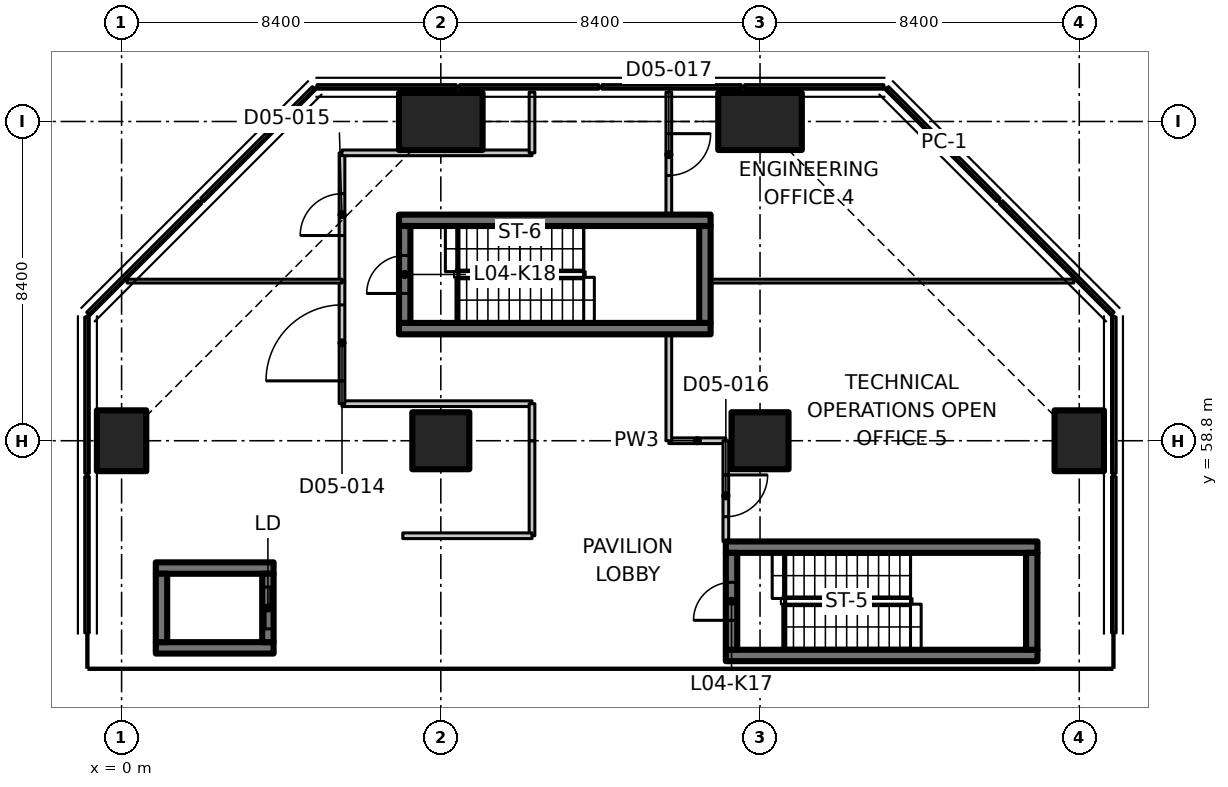
"""IFC4 building model, lengths in metres.
Left out: names, types, materials, properties, quantities, classifications, styles, units other than length and angle.
Written with IfcOpenShell. Run it as: python <this file> out.ifc"""

import sys

from ifc_helpers import new_model, si_unit, direction, frame, frame_2d, origin, origin_2d, place, context, subcontext, project, spatial, polyline, rectangle, outline, extrude, element, fill, save


model = new_model("IFC4")
c1 = context("Model", 3, precision=1e-05, world=origin(), true_north=direction((0.0, 1.0)))
c2 = subcontext(c1, "Body", "Model", "MODEL_VIEW")
j1 = project(units=[si_unit("LENGTHUNIT", "METRE"), si_unit("PLANEANGLEUNIT", "RADIAN")], contexts=[c1])
p1 = place(None, origin())
s1 = spatial("IfcSite", under=j1, at=p1, CompositionType="ELEMENT")
p2 = place(p1, origin())
s2 = spatial("IfcBuilding", under=s1, at=p2, CompositionType="ELEMENT")
p3 = place(p2, frame((0.0, 0.0, 27.5)))
s3 = spatial("IfcBuildingStorey", under=s2, at=p3, CompositionType="ELEMENT", Elevation=27.5)
p4 = place(p3, frame((0.0, 58.8, 0.0), z_axis=(0.0, 0.0, 1.0), x_axis=(1.0, 0.0, 0.0)))
e1 = element("IfcColumn", 1, at=p4, inside=s3, PredefinedType="COLUMN", context=c2, shape_type="SweptSolid", body=[
    extrude(rectangle(XDim=1.3, YDim=1.6, at=origin_2d()), origin(), (0.0, 0.0, 1.0), 4.25),
])
p5 = place(p3, frame((8.4, 58.8, 0.0), z_axis=(0.0, 0.0, 1.0), x_axis=(1.0, 0.0, 0.0)))
e2 = element("IfcColumn", 2, at=p5, inside=s3, PredefinedType="COLUMN", context=c2, shape_type="SweptSolid", body=[
    extrude(rectangle(XDim=1.5, YDim=1.5, at=origin_2d()), origin(), (0.0, 0.0, 1.0), 4.25),
])
p6 = place(p3, frame((8.4, 67.2, 0.0), z_axis=(0.0, 0.0, 1.0), x_axis=(0.0, 1.0, 0.0)))
e3 = element("IfcColumn", 3, at=p6, inside=s3, PredefinedType="COLUMN", context=c2, shape_type="SweptSolid", body=[
    extrude(rectangle(XDim=1.5, YDim=2.2, at=origin_2d()), origin(), (0.0, 0.0, 1.0), 4.25),
])
p7 = place(p3, frame((16.8, 58.8, 0.0), z_axis=(0.0, 0.0, 1.0), x_axis=(1.0, 0.0, 0.0)))
e4 = element("IfcColumn", 4, at=p7, inside=s3, PredefinedType="COLUMN", context=c2, shape_type="SweptSolid", body=[
    extrude(rectangle(XDim=1.5, YDim=1.5, at=origin_2d()), origin(), (0.0, 0.0, 1.0), 4.25),
])
p8 = place(p3, frame((16.8, 67.2, 0.0), z_axis=(0.0, 0.0, 1.0), x_axis=(0.0, 1.0, 0.0)))
e5 = element("IfcColumn", 5, at=p8, inside=s3, PredefinedType="COLUMN", context=c2, shape_type="SweptSolid", body=[
    extrude(rectangle(XDim=1.5, YDim=2.2, at=origin_2d()), origin(), (0.0, 0.0, 1.0), 4.25),
])
p9 = place(p3, frame((25.2, 58.8, 0.0), z_axis=(0.0, 0.0, 1.0), x_axis=(1.0, 0.0, 0.0)))
e6 = element("IfcColumn", 6, at=p9, inside=s3, PredefinedType="COLUMN", context=c2, shape_type="SweptSolid", body=[
    extrude(rectangle(XDim=1.3, YDim=1.6, at=origin_2d()), origin(), (0.0, 0.0, 1.0), 4.25),
])
p10 = place(p2, origin())
s4 = spatial("IfcBuildingStorey", under=s2, at=p10, CompositionType="ELEMENT", Elevation=0.0)
for number, where, z_axis, x_axis in (
    (7, (0.6, 51.6, -6.3), (0.0, 0.0, 1.0), (1.0, 0.0, 0.0)),
    (8, (9.0, 51.6, -6.3), (0.0, 0.0, 1.0), (1.0, 0.0, 0.0)),
):
    element("IfcWall", number, at=place(p10, frame(where, z_axis=z_axis, x_axis=x_axis)), inside=s4, PredefinedType="SOLIDWALL", context=c2, shape_type="SweptSolid", body=[
        extrude(rectangle(XDim=7.2, YDim=2.4, at=frame_2d((3.6, 0.0))), origin(), (0.0, 0.0, 1.0), 42.55),
    ])
p11 = place(p10, frame((17.4, 51.6, -6.3), z_axis=(0.0, 0.0, 1.0), x_axis=(1.0, 0.0, 0.0)))
e9 = element("IfcWall", 9, at=p11, inside=s4, PredefinedType="SOLIDWALL", context=c2, shape_type="SweptSolid", body=[
    extrude(rectangle(XDim=7.2, YDim=2.4, at=frame_2d((3.6, 0.0))), origin(), (0.0, 0.0, 1.0), 42.55),
])
for number, where, z_axis, x_axis in (
    (10, (-1.2, 52.8, 0.0), (0.0, 0.0, 1.0), (0.0, 1.0, 0.0)),
    (11, (26.4, 52.8, 0.0), (0.0, 0.0, 1.0), (0.0, 1.0, 0.0)),
):
    element("IfcWall", number, at=place(p10, frame(where, z_axis=z_axis, x_axis=x_axis)), inside=s4, PredefinedType="SOLIDWALL", context=c2, shape_type="SweptSolid", body=[
        extrude(rectangle(XDim=0.9, YDim=0.6, at=frame_2d((0.45, 0.0))), origin(), (0.0, 0.0, 1.0), 36.23),
    ])
p12 = place(p3, origin())
e12 = element("IfcWall", 12, at=p12, inside=s3, PredefinedType="SOLIDWALL", context=c2, shape_type="SweptSolid", body=[
    extrude(outline(polyline([(26.17, 57.855), (26.05, 57.855), (26.05, 53.745), (26.17, 53.745), (26.17, 57.855)])), origin(), (0.0, 0.0, 1.0), 4.25),
])
p13 = place(p3, origin())
e13 = element("IfcWall", 13, at=p13, inside=s3, PredefinedType="SOLIDWALL", context=c2, shape_type="SweptSolid", body=[
    extrude(outline(polyline([(26.17, 62.055), (26.05, 62.055), (26.05, 57.945), (26.17, 57.945), (26.17, 62.055)])), origin(), (0.0, 0.0, 1.0), 4.25),
])
p14 = place(p3, origin())
e14 = element("IfcWall", 14, at=p14, inside=s3, PredefinedType="SOLIDWALL", context=c2, shape_type="SweptSolid", body=[
    extrude(outline(polyline([(26.033, 62.096), (23.096, 65.033), (23.181, 65.118), (26.118, 62.181), (26.033, 62.096)])), origin(), (0.0, 0.0, 1.0), 4.25),
])
p15 = place(p3, origin())
e15 = element("IfcWall", 15, at=p15, inside=s3, PredefinedType="SOLIDWALL", context=c2, shape_type="SweptSolid", body=[
    extrude(outline(polyline([(23.033, 65.096), (20.096, 68.033), (20.181, 68.118), (23.118, 65.181), (23.033, 65.096)])), origin(), (0.0, 0.0, 1.0), 4.25),
])
p16 = place(p3, origin())
e16 = element("IfcWall", 16, at=p16, inside=s3, PredefinedType="SOLIDWALL", context=c2, shape_type="SweptSolid", body=[
    extrude(outline(polyline([(16.395, 68.17), (16.395, 68.05), (20.055, 68.05), (20.055, 68.17), (16.395, 68.17)])), origin(), (0.0, 0.0, 1.0), 4.25),
])
p17 = place(p3, origin())
e17 = element("IfcWall", 17, at=p17, inside=s3, PredefinedType="SOLIDWALL", context=c2, shape_type="SweptSolid", body=[
    extrude(outline(polyline([(12.645, 68.17), (12.645, 68.05), (16.305, 68.05), (16.305, 68.17), (12.645, 68.17)])), origin(), (0.0, 0.0, 1.0), 4.25),
])
p18 = place(p3, origin())
e18 = element("IfcWall", 18, at=p18, inside=s3, PredefinedType="SOLIDWALL", context=c2, shape_type="SweptSolid", body=[
    extrude(outline(polyline([(8.895, 68.17), (8.895, 68.05), (12.555, 68.05), (12.555, 68.17), (8.895, 68.17)])), origin(), (0.0, 0.0, 1.0), 4.25),
])
p19 = place(p3, origin())
e19 = element("IfcWall", 19, at=p19, inside=s3, PredefinedType="SOLIDWALL", context=c2, shape_type="SweptSolid", body=[
    extrude(outline(polyline([(5.145, 68.17), (5.145, 68.05), (8.805, 68.05), (8.805, 68.17), (5.145, 68.17)])), origin(), (0.0, 0.0, 1.0), 4.25),
])
p20 = place(p3, origin())
e20 = element("IfcWall", 20, at=p20, inside=s3, PredefinedType="SOLIDWALL", context=c2, shape_type="SweptSolid", body=[
    extrude(outline(polyline([(5.104, 68.033), (2.167, 65.096), (2.082, 65.181), (5.019, 68.118), (5.104, 68.033)])), origin(), (0.0, 0.0, 1.0), 4.25),
])
p21 = place(p3, origin())
e21 = element("IfcWall", 21, at=p21, inside=s3, PredefinedType="SOLIDWALL", context=c2, shape_type="SweptSolid", body=[
    extrude(outline(polyline([(2.104, 65.033), (-0.833, 62.096), (-0.918, 62.181), (2.019, 65.118), (2.104, 65.033)])), origin(), (0.0, 0.0, 1.0), 4.25),
])
p22 = place(p3, origin())
e22 = element("IfcWall", 22, at=p22, inside=s3, PredefinedType="SOLIDWALL", context=c2, shape_type="SweptSolid", body=[
    extrude(outline(polyline([(-0.97, 57.945), (-0.85, 57.945), (-0.85, 62.055), (-0.97, 62.055), (-0.97, 57.945)])), origin(), (0.0, 0.0, 1.0), 4.25),
])
p23 = place(p3, origin())
e23 = element("IfcWall", 23, at=p23, inside=s3, PredefinedType="SOLIDWALL", context=c2, shape_type="SweptSolid", body=[
    extrude(outline(polyline([(-0.97, 53.745), (-0.85, 53.745), (-0.85, 57.855), (-0.97, 57.855), (-0.97, 53.745)])), origin(), (0.0, 0.0, 1.0), 4.25),
])
for number, where, z_axis, x_axis in (
    (24, (0.9, 53.35, 0.0), (0.0, 0.0, 1.0), (1.0, 0.0, 0.0)),
    (25, (0.9, 55.45, 0.0), (0.0, 0.0, 1.0), (1.0, 0.0, 0.0)),
):
    element("IfcWall", number, at=place(p3, frame(where, z_axis=z_axis, x_axis=x_axis)), inside=s3, PredefinedType="SHEAR", context=c2, shape_type="SweptSolid", body=[
        extrude(rectangle(XDim=3.1, YDim=0.3, at=frame_2d((1.55, 0.0))), origin(), (0.0, 0.0, 1.0), 4.25),
    ])
p24 = place(p3, frame((1.05, 53.5, 0.0), z_axis=(0.0, 0.0, 1.0), x_axis=(0.0, 1.0, 0.0)))
e26 = element("IfcWall", 26, at=p24, inside=s3, PredefinedType="SHEAR", context=c2, shape_type="SweptSolid", body=[
    extrude(rectangle(XDim=1.8, YDim=0.3, at=frame_2d((0.9, 0.0))), origin(), (0.0, 0.0, 1.0), 4.25),
])
p25 = place(p3, frame((3.85, 53.5, 0.0), z_axis=(0.0, 0.0, 1.0), x_axis=(0.0, 1.0, 0.0)))
e27 = element("IfcWall", 27, at=p25, inside=s3, PredefinedType="SHEAR", context=c2, shape_type="SweptSolid", body=[
    extrude(rectangle(XDim=1.8, YDim=0.3, at=frame_2d((0.9, 0.0))), origin(), (0.0, 0.0, 1.0), 4.25),
])
p26 = place(p25, frame((0.35, 0.0, 0.0)))
e28 = element("IfcOpeningElement", 28, at=p26, cuts=e27, PredefinedType="OPENING", context=c2, shape_type="SweptSolid", body=[
    extrude(rectangle(XDim=1.1, YDim=2.3, at=frame_2d((0.55, 1.15))), frame((0.0, 0.16, 0.0), z_axis=(0.0, -1.0, 0.0), x_axis=(1.0, 0.0, 0.0)), (0.0, 0.0, 1.0), 0.32),
])
for number, where, z_axis, x_axis in (
    (29, (15.9, 53.15, 0.0), (0.0, 0.0, 1.0), (1.0, 0.0, 0.0)),
    (30, (15.9, 56.0, 0.0), (0.0, 0.0, 1.0), (1.0, 0.0, 0.0)),
):
    element("IfcWall", number, at=place(p3, frame(where, z_axis=z_axis, x_axis=x_axis)), inside=s3, PredefinedType="SHEAR", context=c2, shape_type="SweptSolid", body=[
        extrude(rectangle(XDim=8.2, YDim=0.3, at=frame_2d((4.1, 0.0))), origin(), (0.0, 0.0, 1.0), 4.25),
    ])
p27 = place(p3, frame((16.05, 53.3, 0.0), z_axis=(0.0, 0.0, 1.0), x_axis=(0.0, 1.0, 0.0)))
e31 = element("IfcWall", 31, at=p27, inside=s3, PredefinedType="SHEAR", context=c2, shape_type="SweptSolid", body=[
    extrude(rectangle(XDim=2.55, YDim=0.3, at=frame_2d((1.275, 0.0))), origin(), (0.0, 0.0, 1.0), 4.25),
])
p28 = place(p27, frame((0.775, 0.0, 0.0)))
e32 = element("IfcOpeningElement", 32, at=p28, cuts=e31, PredefinedType="OPENING", context=c2, shape_type="SweptSolid", body=[
    extrude(rectangle(XDim=1.0, YDim=2.1, at=frame_2d((0.5, 1.05))), frame((0.0, 0.16, 0.0), z_axis=(0.0, -1.0, 0.0), x_axis=(1.0, 0.0, 0.0)), (0.0, 0.0, 1.0), 0.32),
])
p29 = place(p3, frame((23.95, 53.3, 0.0), z_axis=(0.0, 0.0, 1.0), x_axis=(0.0, 1.0, 0.0)))
e33 = element("IfcWall", 33, at=p29, inside=s3, PredefinedType="SHEAR", context=c2, shape_type="SweptSolid", body=[
    extrude(rectangle(XDim=2.55, YDim=0.3, at=frame_2d((1.275, 0.0))), origin(), (0.0, 0.0, 1.0), 4.25),
])
for number, where, z_axis, x_axis in (
    (34, (7.3, 61.75, 0.0), (0.0, 0.0, 1.0), (1.0, 0.0, 0.0)),
    (35, (7.3, 64.6, 0.0), (0.0, 0.0, 1.0), (1.0, 0.0, 0.0)),
):
    element("IfcWall", number, at=place(p3, frame(where, z_axis=z_axis, x_axis=x_axis)), inside=s3, PredefinedType="SHEAR", context=c2, shape_type="SweptSolid", body=[
        extrude(rectangle(XDim=8.2, YDim=0.3, at=frame_2d((4.1, 0.0))), origin(), (0.0, 0.0, 1.0), 4.25),
    ])
p30 = place(p3, frame((7.45, 61.9, 0.0), z_axis=(0.0, 0.0, 1.0), x_axis=(0.0, 1.0, 0.0)))
e36 = element("IfcWall", 36, at=p30, inside=s3, PredefinedType="SHEAR", context=c2, shape_type="SweptSolid", body=[
    extrude(rectangle(XDim=2.55, YDim=0.3, at=frame_2d((1.275, 0.0))), origin(), (0.0, 0.0, 1.0), 4.25),
])
p31 = place(p30, frame((0.775, 0.0, 0.0)))
e37 = element("IfcOpeningElement", 37, at=p31, cuts=e36, PredefinedType="OPENING", context=c2, shape_type="SweptSolid", body=[
    extrude(rectangle(XDim=1.0, YDim=2.1, at=frame_2d((0.5, 1.05))), frame((0.0, 0.16, 0.0), z_axis=(0.0, -1.0, 0.0), x_axis=(1.0, 0.0, 0.0)), (0.0, 0.0, 1.0), 0.32),
])
p32 = place(p3, frame((15.35, 61.9, 0.0), z_axis=(0.0, 0.0, 1.0), x_axis=(0.0, 1.0, 0.0)))
e38 = element("IfcWall", 38, at=p32, inside=s3, PredefinedType="SHEAR", context=c2, shape_type="SweptSolid", body=[
    extrude(rectangle(XDim=2.55, YDim=0.3, at=frame_2d((1.275, 0.0))), origin(), (0.0, 0.0, 1.0), 4.25),
])
p33 = place(p3, frame((10.8, 56.3, 0.0), z_axis=(0.0, 0.0, 1.0), x_axis=(0.0, 1.0, 0.0)))
e39 = element("IfcWall", 39, at=p33, inside=s3, PredefinedType="PARTITIONING", context=c2, shape_type="SweptSolid", body=[
    extrude(rectangle(XDim=2.5, YDim=0.15, at=frame_2d((1.25, 0.0))), origin(), (0.0, 0.0, 1.0), 4.23),
])
p34 = place(p3, frame((14.4, 58.8, 0.0), z_axis=(0.0, 0.0, 1.0), x_axis=(1.0, 0.0, 0.0)))
e40 = element("IfcWall", 40, at=p34, inside=s3, PredefinedType="PARTITIONING", context=c2, shape_type="SweptSolid", body=[
    extrude(rectangle(XDim=1.5, YDim=0.15, at=frame_2d((0.75, 0.0))), origin(), (0.0, 0.0, 1.0), 4.23),
])
p35 = place(p3, frame((15.9, 58.8, 0.0), z_axis=(0.0, 0.0, 1.0), x_axis=(0.0, -1.0, 0.0)))
e41 = element("IfcWall", 41, at=p35, inside=s3, PredefinedType="PARTITIONING", context=c2, shape_type="SweptSolid", body=[
    extrude(rectangle(XDim=2.65, YDim=0.15, at=frame_2d((1.325, 0.0))), origin(), (0.0, 0.0, 1.0), 4.23),
])
p36 = place(p35, frame((0.9, 0.0, 0.0)))
e42 = element("IfcOpeningElement", 42, at=p36, cuts=e41, PredefinedType="OPENING", context=c2, shape_type="SweptSolid", body=[
    extrude(rectangle(XDim=1.1, YDim=2.1, at=frame_2d((0.55, 1.05))), frame((0.0, 0.085, 0.0), z_axis=(0.0, -1.0, 0.0), x_axis=(1.0, 0.0, 0.0)), (0.0, 0.0, 1.0), 0.17),
])
p37 = place(p3, frame((10.8, 59.775, 0.0), z_axis=(0.0, 0.0, 1.0), x_axis=(-1.0, 0.0, 0.0)))
e43 = element("IfcWall", 43, at=p37, inside=s3, PredefinedType="PARTITIONING", context=c2, shape_type="SweptSolid", body=[
    extrude(rectangle(XDim=5.0, YDim=0.15, at=frame_2d((2.5, 0.0))), origin(), (0.0, 0.0, 1.0), 4.23),
])
p38 = place(p3, frame((5.8, 59.775, 0.0), z_axis=(0.0, 0.0, 1.0), x_axis=(0.0, 1.0, 0.0)))
e44 = element("IfcWall", 44, at=p38, inside=s3, PredefinedType="PARTITIONING", context=c2, shape_type="SweptSolid", body=[
    extrude(rectangle(XDim=3.225, YDim=0.15, at=frame_2d((1.613, 0.0))), origin(), (0.0, 0.0, 1.0), 4.23),
])
p39 = place(p38, frame((0.6, 0.0, 0.0)))
e45 = element("IfcOpeningElement", 45, at=p39, cuts=e44, PredefinedType="OPENING", context=c2, shape_type="SweptSolid", body=[
    extrude(rectangle(XDim=2.0, YDim=2.4, at=frame_2d((1.0, 1.2))), frame((0.0, 0.085, 0.0), z_axis=(0.0, -1.0, 0.0), x_axis=(1.0, 0.0, 0.0)), (0.0, 0.0, 1.0), 0.17),
])
p40 = place(p3, frame((5.8, 63.0, 0.0), z_axis=(0.0, 0.0, 1.0), x_axis=(0.0, 1.0, 0.0)))
e46 = element("IfcWall", 46, at=p40, inside=s3, PredefinedType="PARTITIONING", context=c2, shape_type="SweptSolid", body=[
    extrude(rectangle(XDim=3.375, YDim=0.15, at=frame_2d((1.688, 0.0))), origin(), (0.0, 0.0, 1.0), 3.88),
])
p41 = place(p40, frame((1.2, 0.0, 0.0)))
e47 = element("IfcOpeningElement", 47, at=p41, cuts=e46, PredefinedType="OPENING", context=c2, shape_type="SweptSolid", body=[
    extrude(rectangle(XDim=1.1, YDim=2.1, at=frame_2d((0.55, 1.05))), frame((0.0, 0.085, 0.0), z_axis=(0.0, -1.0, 0.0), x_axis=(1.0, 0.0, 0.0)), (0.0, 0.0, 1.0), 0.17),
])
p42 = place(p3, frame((5.8, 66.375, 0.0), z_axis=(0.0, 0.0, 1.0), x_axis=(1.0, 0.0, 0.0)))
e48 = element("IfcWall", 48, at=p42, inside=s3, PredefinedType="PARTITIONING", context=c2, shape_type="SweptSolid", body=[
    extrude(outline(polyline([(0.0, 0.0), (5.0, 0.0), (5.0, 4.23), (2.466, 4.23), (2.464, 3.88), (1.086, 3.88), (1.084, 4.23), (0.0, 4.23), (0.0, 0.0)])), frame((0.0, 0.075, 0.0), z_axis=(0.0, -1.0, 0.0), x_axis=(1.0, 0.0, 0.0)), (0.0, 0.0, 1.0), 0.15),
])
p43 = place(p3, frame((7.4, 56.3, 0.0), z_axis=(0.0, 0.0, 1.0), x_axis=(1.0, 0.0, 0.0)))
e49 = element("IfcWall", 49, at=p43, inside=s3, PredefinedType="PARTITIONING", context=c2, shape_type="SweptSolid", body=[
    extrude(rectangle(XDim=3.4, YDim=0.15, at=frame_2d((1.7, 0.0))), origin(), (0.0, 0.0, 1.0), 4.23),
])
p44 = place(p3, frame((10.8, 66.375, 0.0), z_axis=(0.0, 0.0, 1.0), x_axis=(0.0, 1.0, 0.0)))
e50 = element("IfcWall", 50, at=p44, inside=s3, PredefinedType="PARTITIONING", context=c2, shape_type="SweptSolid", body=[
    extrude(rectangle(XDim=1.598, YDim=0.15, at=frame_2d((0.799, 0.0))), origin(), (0.0, 0.0, 1.0), 3.88),
])
p45 = place(p3, frame((14.4, 67.973, 0.0), z_axis=(0.0, 0.0, 1.0), x_axis=(0.0, -1.0, 0.0)))
e51 = element("IfcWall", 51, at=p45, inside=s3, PredefinedType="PARTITIONING", context=c2, shape_type="SweptSolid", body=[
    extrude(rectangle(XDim=3.223, YDim=0.15, at=frame_2d((1.611, 0.0))), origin(), (0.0, 0.0, 1.0), 3.88),
])
p46 = place(p45, frame((1.093, 0.0, 0.0)))
e52 = element("IfcOpeningElement", 52, at=p46, cuts=e51, PredefinedType="OPENING", context=c2, shape_type="SweptSolid", body=[
    extrude(rectangle(XDim=1.1, YDim=2.1, at=frame_2d((0.55, 1.05))), frame((0.0, 0.085, 0.0), z_axis=(0.0, -1.0, 0.0), x_axis=(1.0, 0.0, 0.0)), (0.0, 0.0, 1.0), 0.17),
])
p47 = place(p3, frame((0.144, 63.0, 0.0), z_axis=(0.0, 0.0, 1.0), x_axis=(1.0, 0.0, 0.0)))
e53 = element("IfcWall", 53, at=p47, inside=s3, PredefinedType="PARTITIONING", context=c2, shape_type="SweptSolid", body=[
    extrude(outline(polyline([(0.0, 0.0), (5.656, 0.0), (5.656, 4.23), (4.721, 4.23), (4.719, 3.88), (3.392, 3.88), (3.39, 4.23), (0.0, 4.23), (0.0, 0.0)])), frame((0.0, 0.05, 0.0), z_axis=(0.0, -1.0, 0.0), x_axis=(1.0, 0.0, 0.0)), (0.0, 0.0, 1.0), 0.1),
])
p48 = place(p3, frame((10.8, 59.775, 0.0), z_axis=(0.0, 0.0, 1.0), x_axis=(0.0, -1.0, 0.0)))
e54 = element("IfcWall", 54, at=p48, inside=s3, PredefinedType="PARTITIONING", context=c2, shape_type="SweptSolid", body=[
    extrude(rectangle(XDim=0.975, YDim=0.15, at=frame_2d((0.487, 0.0))), origin(), (0.0, 0.0, 1.0), 4.23),
])
p49 = place(p3, frame((15.5, 63.0, 0.0), z_axis=(0.0, 0.0, 1.0), x_axis=(1.0, 0.0, 0.0)))
e55 = element("IfcWall", 55, at=p49, inside=s3, PredefinedType="PARTITIONING", context=c2, shape_type="SweptSolid", body=[
    extrude(outline(polyline([(0.0, 0.0), (9.556, 0.0), (9.556, 4.23), (6.166, 4.23), (6.164, 3.88), (4.836, 3.88), (4.834, 4.23), (0.0, 4.23), (0.0, 0.0)])), frame((0.0, 0.05, 0.0), z_axis=(0.0, -1.0, 0.0), x_axis=(1.0, 0.0, 0.0)), (0.0, 0.0, 1.0), 0.1),
])
p50 = place(p3, frame((14.4, 58.8, 0.0), z_axis=(0.0, 0.0, 1.0), x_axis=(0.0, 1.0, 0.0)))
e56 = element("IfcWall", 56, at=p50, inside=s3, PredefinedType="PARTITIONING", context=c2, shape_type="SweptSolid", body=[
    extrude(rectangle(XDim=2.8, YDim=0.15, at=frame_2d((1.4, 0.0))), origin(), (0.0, 0.0, 1.0), 4.23),
])
p51 = place(p26, origin())
e57 = element("IfcDoor", 57, at=p51, inside=s3, OperationType="SLIDING_TO_LEFT", PredefinedType="DOOR", context=c2, shape_type="SweptSolid", body=[
    extrude(rectangle(XDim=1.1, YDim=2.3, at=frame_2d((0.55, 1.15))), frame((0.0, 0.025, 0.0), z_axis=(0.0, -1.0, 0.0), x_axis=(1.0, 0.0, 0.0)), (0.0, 0.0, 1.0), 0.05),
])
fill(e28, e57)
p52 = place(p28, origin())
e58 = element("IfcDoor", 58, at=p52, inside=s3, OperationType="SINGLE_SWING_LEFT", PredefinedType="DOOR", context=c2, shape_type="SweptSolid", body=[
    extrude(rectangle(XDim=1.0, YDim=2.1, at=frame_2d((0.5, 1.05))), frame((0.0, 0.025, 0.0), z_axis=(0.0, -1.0, 0.0), x_axis=(1.0, 0.0, 0.0)), (0.0, 0.0, 1.0), 0.05),
])
fill(e32, e58)
p53 = place(p31, origin())
e59 = element("IfcDoor", 59, at=p53, inside=s3, OperationType="SINGLE_SWING_RIGHT", PredefinedType="DOOR", context=c2, shape_type="SweptSolid", body=[
    extrude(rectangle(XDim=1.0, YDim=2.1, at=frame_2d((0.5, 1.05))), frame((0.0, 0.025, 0.0), z_axis=(0.0, -1.0, 0.0), x_axis=(1.0, 0.0, 0.0)), (0.0, 0.0, 1.0), 0.05),
])
fill(e37, e59)
p54 = place(p39, origin())
e60 = element("IfcDoor", 60, at=p54, inside=s3, OperationType="DOUBLE_DOOR_SINGLE_SWING", PredefinedType="DOOR", context=c2, shape_type="SweptSolid", body=[
    extrude(rectangle(XDim=2.0, YDim=2.4, at=frame_2d((1.0, 1.2))), frame((0.0, 0.025, 0.0), z_axis=(0.0, -1.0, 0.0), x_axis=(1.0, 0.0, 0.0)), (0.0, 0.0, 1.0), 0.05),
])
fill(e45, e60)
p55 = place(p41, origin())
e61 = element("IfcDoor", 61, at=p55, inside=s3, OperationType="SINGLE_SWING_LEFT", PredefinedType="DOOR", context=c2, shape_type="SweptSolid", body=[
    extrude(rectangle(XDim=1.1, YDim=2.1, at=frame_2d((0.55, 1.05))), frame((0.0, 0.025, 0.0), z_axis=(0.0, -1.0, 0.0), x_axis=(1.0, 0.0, 0.0)), (0.0, 0.0, 1.0), 0.05),
])
fill(e47, e61)
p56 = place(p36, origin())
e62 = element("IfcDoor", 62, at=p56, inside=s3, OperationType="SINGLE_SWING_LEFT", PredefinedType="DOOR", context=c2, shape_type="SweptSolid", body=[
    extrude(rectangle(XDim=1.1, YDim=2.1, at=frame_2d((0.55, 1.05))), frame((0.0, 0.025, 0.0), z_axis=(0.0, -1.0, 0.0), x_axis=(1.0, 0.0, 0.0)), (0.0, 0.0, 1.0), 0.05),
])
fill(e42, e62)
p57 = place(p46, origin())
e63 = element("IfcDoor", 63, at=p57, inside=s3, OperationType="SINGLE_SWING_LEFT", PredefinedType="DOOR", context=c2, shape_type="SweptSolid", body=[
    extrude(rectangle(XDim=1.1, YDim=2.1, at=frame_2d((0.55, 1.05))), frame((0.0, 0.025, 0.0), z_axis=(0.0, -1.0, 0.0), x_axis=(1.0, 0.0, 0.0)), (0.0, 0.0, 1.0), 0.05),
])
fill(e52, e63)
save(model, sys.argv[1])
